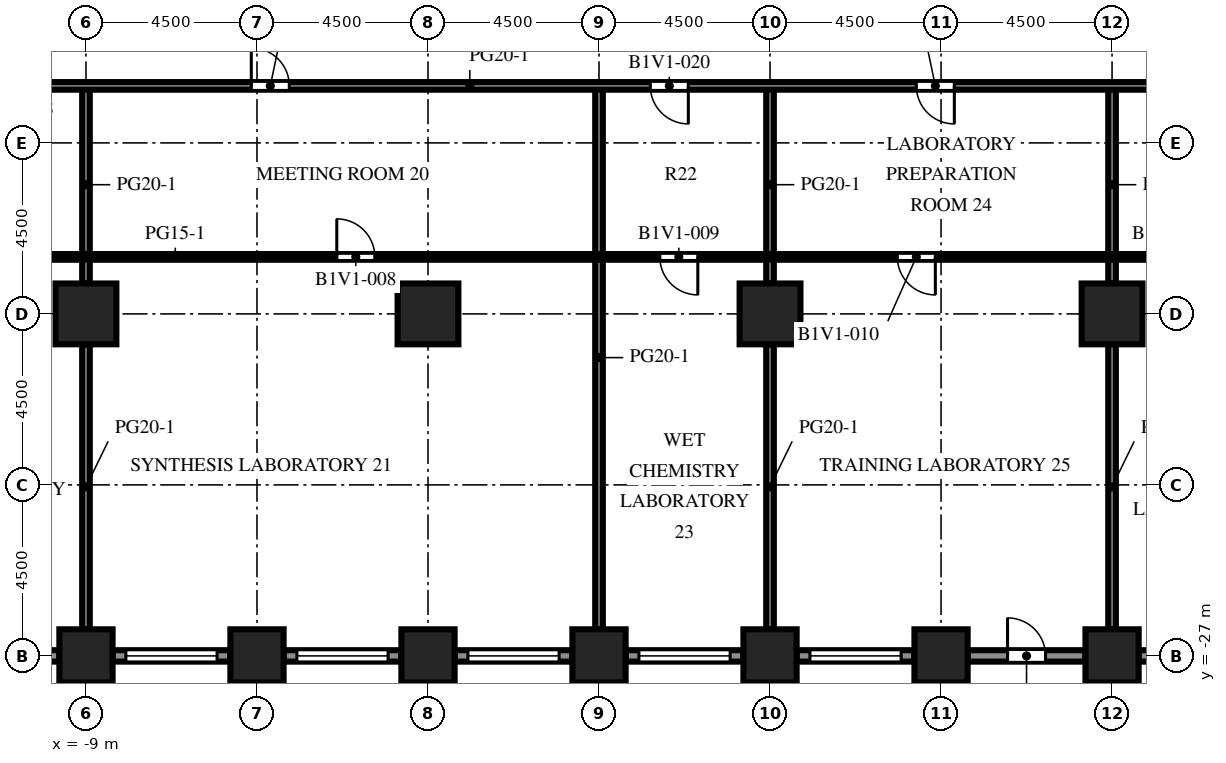
"""IFC4 building model, lengths in metres.
Left out: names, types, materials, properties, quantities, classifications, styles, units other than length and angle.
Written with IfcOpenShell. Run it as: python <this file> out.ifc"""

import sys

from ifc_helpers import new_model, si_unit, direction, frame, frame_2d, origin, origin_2d, place, context, subcontext, project, spatial, rectangle, extrude, element, fill, save


model = new_model("IFC4")
c1 = context("Model", 3, precision=1e-05, world=origin(), true_north=direction((0.0, 1.0)))
c2 = subcontext(c1, "Body", "Model", "MODEL_VIEW")
j1 = project(units=[si_unit("LENGTHUNIT", "METRE"), si_unit("PLANEANGLEUNIT", "RADIAN")], contexts=[c1])
p1 = place(None, origin())
s1 = spatial("IfcSite", under=j1, at=p1, CompositionType="ELEMENT")
p2 = place(p1, origin())
s2 = spatial("IfcBuilding", under=s1, at=p2, CompositionType="ELEMENT")
p3 = place(p2, frame((0.0, 0.0, 23.6)))
s3 = spatial("IfcBuildingStorey", under=s2, at=p3, CompositionType="ELEMENT", Elevation=23.6)
for number, where, z_axis, x_axis in (
    (1, (-9.0, -27.0, 0.0), (0.0, 0.0, 1.0), (1.0, 0.0, 0.0)),
    (2, (-4.5, -27.0, 0.0), (0.0, 0.0, 1.0), (1.0, 0.0, 0.0)),
    (3, (0.0, -27.0, 0.0), (0.0, 0.0, 1.0), (1.0, 0.0, 0.0)),
    (4, (4.5, -27.0, 0.0), (0.0, 0.0, 1.0), (1.0, 0.0, 0.0)),
    (5, (9.0, -27.0, 0.0), (0.0, 0.0, 1.0), (1.0, 0.0, 0.0)),
    (6, (13.5, -27.0, 0.0), (0.0, 0.0, 1.0), (1.0, 0.0, 0.0)),
    (7, (18.0, -27.0, 0.0), (0.0, 0.0, 1.0), (1.0, 0.0, 0.0)),
):
    element("IfcColumn", number, at=place(p3, frame(where, z_axis=z_axis, x_axis=x_axis)), inside=s3, PredefinedType="COLUMN", context=c2, shape_type="SweptSolid", body=[
        extrude(rectangle(XDim=1.4, YDim=1.4, at=origin_2d()), origin(), (0.0, 0.0, 1.0), 4.1),
    ])
for number, where, z_axis, x_axis in (
    (8, (-9.0, -18.0, 0.0), (0.0, 0.0, 1.0), (1.0, 0.0, 0.0)),
    (9, (0.0, -18.0, 0.0), (0.0, 0.0, 1.0), (1.0, 0.0, 0.0)),
    (10, (9.0, -18.0, 0.0), (0.0, 0.0, 1.0), (1.0, 0.0, 0.0)),
    (11, (18.0, -18.0, 0.0), (0.0, 0.0, 1.0), (1.0, 0.0, 0.0)),
):
    element("IfcColumn", number, at=place(p3, frame(where, z_axis=z_axis, x_axis=x_axis)), inside=s3, PredefinedType="COLUMN", context=c2, shape_type="SweptSolid", body=[
        extrude(rectangle(XDim=1.6, YDim=1.6, at=origin_2d()), origin(), (0.0, 0.0, 1.0), 4.1),
    ])
p4 = place(p3, frame((-9.7, -27.0, 0.0), z_axis=(0.0, 0.0, 1.0), x_axis=(-1.0, 0.0, 0.0)))
e12 = element("IfcWall", 12, at=p4, inside=s3, PredefinedType="SOLIDWALL", context=c2, shape_type="SweptSolid", body=[
    extrude(rectangle(XDim=3.1, YDim=0.3, at=frame_2d((1.55, 0.0))), origin(), (0.0, 0.0, 1.0), 2.75),
])
p5 = place(p4, frame((0.35, 0.0, 0.8)))
e13 = element("IfcOpeningElement", 13, at=p5, cuts=e12, PredefinedType="OPENING", context=c2, shape_type="SweptSolid", body=[
    extrude(rectangle(XDim=2.4, YDim=1.7, at=frame_2d((1.2, 0.85))), frame((0.0, 0.16, 0.0), z_axis=(0.0, -1.0, 0.0), x_axis=(1.0, 0.0, 0.0)), (0.0, 0.0, 1.0), 0.32),
])
p6 = place(p3, frame((-5.2, -27.0, 0.0), z_axis=(0.0, 0.0, 1.0), x_axis=(-1.0, 0.0, 0.0)))
e14 = element("IfcWall", 14, at=p6, inside=s3, PredefinedType="SOLIDWALL", context=c2, shape_type="SweptSolid", body=[
    extrude(rectangle(XDim=3.1, YDim=0.3, at=frame_2d((1.55, 0.0))), origin(), (0.0, 0.0, 1.0), 2.75),
])
p7 = place(p6, frame((0.35, 0.0, 0.8)))
e15 = element("IfcOpeningElement", 15, at=p7, cuts=e14, PredefinedType="OPENING", context=c2, shape_type="SweptSolid", body=[
    extrude(rectangle(XDim=2.4, YDim=1.7, at=frame_2d((1.2, 0.85))), frame((0.0, 0.16, 0.0), z_axis=(0.0, -1.0, 0.0), x_axis=(1.0, 0.0, 0.0)), (0.0, 0.0, 1.0), 0.32),
])
p8 = place(p3, frame((-0.7, -27.0, 0.0), z_axis=(0.0, 0.0, 1.0), x_axis=(-1.0, 0.0, 0.0)))
e16 = element("IfcWall", 16, at=p8, inside=s3, PredefinedType="SOLIDWALL", context=c2, shape_type="SweptSolid", body=[
    extrude(rectangle(XDim=3.1, YDim=0.3, at=frame_2d((1.55, 0.0))), origin(), (0.0, 0.0, 1.0), 2.75),
])
p9 = place(p8, frame((0.35, 0.0, 0.8)))
e17 = element("IfcOpeningElement", 17, at=p9, cuts=e16, PredefinedType="OPENING", context=c2, shape_type="SweptSolid", body=[
    extrude(rectangle(XDim=2.4, YDim=1.7, at=frame_2d((1.2, 0.85))), frame((0.0, 0.16, 0.0), z_axis=(0.0, -1.0, 0.0), x_axis=(1.0, 0.0, 0.0)), (0.0, 0.0, 1.0), 0.32),
])
p10 = place(p3, frame((3.8, -27.0, 0.0), z_axis=(0.0, 0.0, 1.0), x_axis=(-1.0, 0.0, 0.0)))
e18 = element("IfcWall", 18, at=p10, inside=s3, PredefinedType="SOLIDWALL", context=c2, shape_type="SweptSolid", body=[
    extrude(rectangle(XDim=3.1, YDim=0.3, at=frame_2d((1.55, 0.0))), origin(), (0.0, 0.0, 1.0), 2.75),
])
p11 = place(p10, frame((0.35, 0.0, 0.8)))
e19 = element("IfcOpeningElement", 19, at=p11, cuts=e18, PredefinedType="OPENING", context=c2, shape_type="SweptSolid", body=[
    extrude(rectangle(XDim=2.4, YDim=1.7, at=frame_2d((1.2, 0.85))), frame((0.0, 0.16, 0.0), z_axis=(0.0, -1.0, 0.0), x_axis=(1.0, 0.0, 0.0)), (0.0, 0.0, 1.0), 0.32),
])
p12 = place(p3, frame((8.3, -27.0, 0.0), z_axis=(0.0, 0.0, 1.0), x_axis=(-1.0, 0.0, 0.0)))
e20 = element("IfcWall", 20, at=p12, inside=s3, PredefinedType="SOLIDWALL", context=c2, shape_type="SweptSolid", body=[
    extrude(rectangle(XDim=3.1, YDim=0.3, at=frame_2d((1.55, 0.0))), origin(), (0.0, 0.0, 1.0), 2.75),
])
p13 = place(p12, frame((0.35, 0.0, 0.8)))
e21 = element("IfcOpeningElement", 21, at=p13, cuts=e20, PredefinedType="OPENING", context=c2, shape_type="SweptSolid", body=[
    extrude(rectangle(XDim=2.4, YDim=1.7, at=frame_2d((1.2, 0.85))), frame((0.0, 0.16, 0.0), z_axis=(0.0, -1.0, 0.0), x_axis=(1.0, 0.0, 0.0)), (0.0, 0.0, 1.0), 0.32),
])
p14 = place(p3, frame((12.8, -27.0, 0.0), z_axis=(0.0, 0.0, 1.0), x_axis=(-1.0, 0.0, 0.0)))
e22 = element("IfcWall", 22, at=p14, inside=s3, PredefinedType="SOLIDWALL", context=c2, shape_type="SweptSolid", body=[
    extrude(rectangle(XDim=3.1, YDim=0.3, at=frame_2d((1.55, 0.0))), origin(), (0.0, 0.0, 1.0), 2.75),
])
p15 = place(p14, frame((0.35, 0.0, 0.8)))
e23 = element("IfcOpeningElement", 23, at=p15, cuts=e22, PredefinedType="OPENING", context=c2, shape_type="SweptSolid", body=[
    extrude(rectangle(XDim=2.4, YDim=1.7, at=frame_2d((1.2, 0.85))), frame((0.0, 0.16, 0.0), z_axis=(0.0, -1.0, 0.0), x_axis=(1.0, 0.0, 0.0)), (0.0, 0.0, 1.0), 0.32),
])
p16 = place(p3, frame((17.3, -27.0, 0.0), z_axis=(0.0, 0.0, 1.0), x_axis=(-1.0, 0.0, 0.0)))
e24 = element("IfcWall", 24, at=p16, inside=s3, PredefinedType="SOLIDWALL", context=c2, shape_type="SweptSolid", body=[
    extrude(rectangle(XDim=3.1, YDim=0.3, at=frame_2d((1.55, 0.0))), origin(), (0.0, 0.0, 1.0), 2.75),
])
p17 = place(p16, frame((1.05, 0.0, 0.0)))
e25 = element("IfcOpeningElement", 25, at=p17, cuts=e24, PredefinedType="OPENING", context=c2, shape_type="SweptSolid", body=[
    extrude(rectangle(XDim=1.0, YDim=2.2, at=frame_2d((0.5, 1.1))), frame((0.0, 0.16, 0.0), z_axis=(0.0, -1.0, 0.0), x_axis=(1.0, 0.0, 0.0)), (0.0, 0.0, 1.0), 0.32),
])
p18 = place(p3, frame((21.8, -27.0, 0.0), z_axis=(0.0, 0.0, 1.0), x_axis=(-1.0, 0.0, 0.0)))
e26 = element("IfcWall", 26, at=p18, inside=s3, PredefinedType="SOLIDWALL", context=c2, shape_type="SweptSolid", body=[
    extrude(rectangle(XDim=3.1, YDim=0.3, at=frame_2d((1.55, 0.0))), origin(), (0.0, 0.0, 1.0), 2.75),
])
p19 = place(p18, frame((0.35, 0.0, 0.8)))
e27 = element("IfcOpeningElement", 27, at=p19, cuts=e26, PredefinedType="OPENING", context=c2, shape_type="SweptSolid", body=[
    extrude(rectangle(XDim=2.4, YDim=1.7, at=frame_2d((1.2, 0.85))), frame((0.0, 0.16, 0.0), z_axis=(0.0, -1.0, 0.0), x_axis=(1.0, 0.0, 0.0)), (0.0, 0.0, 1.0), 0.32),
])
p20 = place(p3, frame((-9.0, -26.3, 0.0), z_axis=(0.0, 0.0, 1.0), x_axis=(0.0, 1.0, 0.0)))
e28 = element("IfcWall", 28, at=p20, inside=s3, PredefinedType="PARTITIONING", context=c2, shape_type="SweptSolid", body=[
    extrude(rectangle(XDim=7.5, YDim=0.2, at=frame_2d((3.75, 0.0))), origin(), (0.0, 0.0, 1.0), 3.65),
])
p21 = place(p3, frame((-9.0, -17.2, 0.0), z_axis=(0.0, 0.0, 1.0), x_axis=(0.0, 1.0, 0.0)))
e29 = element("IfcWall", 29, at=p21, inside=s3, PredefinedType="PARTITIONING", context=c2, shape_type="SweptSolid", body=[
    extrude(rectangle(XDim=5.2, YDim=0.2, at=frame_2d((2.6, 0.0))), origin(), (0.0, 0.0, 1.0), 3.65),
])
p22 = place(p3, frame((4.5, -26.3, 0.0), z_axis=(0.0, 0.0, 1.0), x_axis=(0.0, 1.0, 0.0)))
e30 = element("IfcWall", 30, at=p22, inside=s3, PredefinedType="PARTITIONING", context=c2, shape_type="SweptSolid", body=[
    extrude(rectangle(XDim=14.3, YDim=0.2, at=frame_2d((7.15, 0.0))), origin(), (0.0, 0.0, 1.0), 3.65),
])
p23 = place(p3, frame((9.0, -26.3, 0.0), z_axis=(0.0, 0.0, 1.0), x_axis=(0.0, 1.0, 0.0)))
e31 = element("IfcWall", 31, at=p23, inside=s3, PredefinedType="PARTITIONING", context=c2, shape_type="SweptSolid", body=[
    extrude(rectangle(XDim=7.5, YDim=0.2, at=frame_2d((3.75, 0.0))), origin(), (0.0, 0.0, 1.0), 3.65),
])
p24 = place(p3, frame((9.0, -17.2, 0.0), z_axis=(0.0, 0.0, 1.0), x_axis=(0.0, 1.0, 0.0)))
e32 = element("IfcWall", 32, at=p24, inside=s3, PredefinedType="PARTITIONING", context=c2, shape_type="SweptSolid", body=[
    extrude(rectangle(XDim=5.2, YDim=0.2, at=frame_2d((2.6, 0.0))), origin(), (0.0, 0.0, 1.0), 3.65),
])
p25 = place(p3, frame((18.0, -26.3, 0.0), z_axis=(0.0, 0.0, 1.0), x_axis=(0.0, 1.0, 0.0)))
e33 = element("IfcWall", 33, at=p25, inside=s3, PredefinedType="PARTITIONING", context=c2, shape_type="SweptSolid", body=[
    extrude(rectangle(XDim=7.5, YDim=0.2, at=frame_2d((3.75, 0.0))), origin(), (0.0, 0.0, 1.0), 3.65),
])
p26 = place(p3, frame((18.0, -17.2, 0.0), z_axis=(0.0, 0.0, 1.0), x_axis=(0.0, 1.0, 0.0)))
e34 = element("IfcWall", 34, at=p26, inside=s3, PredefinedType="PARTITIONING", context=c2, shape_type="SweptSolid", body=[
    extrude(rectangle(XDim=5.2, YDim=0.2, at=frame_2d((2.6, 0.0))), origin(), (0.0, 0.0, 1.0), 3.65),
])
p27 = place(p3, frame((26.85, -16.5, 0.0), z_axis=(0.0, 0.0, 1.0), x_axis=(-1.0, 0.0, 0.0)))
e35 = element("IfcWall", 35, at=p27, inside=s3, PredefinedType="PARTITIONING", context=c2, shape_type="SweptSolid", body=[
    extrude(rectangle(XDim=53.7, YDim=0.15, at=frame_2d((26.85, 0.0))), origin(), (0.0, 0.0, 1.0), 3.65),
])
p28 = place(p27, frame((50.75, 0.0, 0.0)))
e36 = element("IfcOpeningElement", 36, at=p28, cuts=e35, PredefinedType="OPENING", context=c2, shape_type="SweptSolid", body=[
    extrude(rectangle(XDim=1.0, YDim=2.1, at=frame_2d((0.5, 1.05))), frame((0.0, 0.085, 0.0), z_axis=(0.0, -1.0, 0.0), x_axis=(1.0, 0.0, 0.0)), (0.0, 0.0, 1.0), 0.17),
])
p29 = place(p27, frame((45.75, 0.0, 0.0)))
e37 = element("IfcOpeningElement", 37, at=p29, cuts=e35, PredefinedType="OPENING", context=c2, shape_type="SweptSolid", body=[
    extrude(rectangle(XDim=1.0, YDim=2.1, at=frame_2d((0.5, 1.05))), frame((0.0, 0.085, 0.0), z_axis=(0.0, -1.0, 0.0), x_axis=(1.0, 0.0, 0.0)), (0.0, 0.0, 1.0), 0.17),
])
p30 = place(p27, frame((37.75, 0.0, 0.0)))
e38 = element("IfcOpeningElement", 38, at=p30, cuts=e35, PredefinedType="OPENING", context=c2, shape_type="SweptSolid", body=[
    extrude(rectangle(XDim=1.0, YDim=2.1, at=frame_2d((0.5, 1.05))), frame((0.0, 0.085, 0.0), z_axis=(0.0, -1.0, 0.0), x_axis=(1.0, 0.0, 0.0)), (0.0, 0.0, 1.0), 0.17),
])
p31 = place(p27, frame((28.25, 0.0, 0.0)))
e39 = element("IfcOpeningElement", 39, at=p31, cuts=e35, PredefinedType="OPENING", context=c2, shape_type="SweptSolid", body=[
    extrude(rectangle(XDim=1.0, YDim=2.1, at=frame_2d((0.5, 1.05))), frame((0.0, 0.085, 0.0), z_axis=(0.0, -1.0, 0.0), x_axis=(1.0, 0.0, 0.0)), (0.0, 0.0, 1.0), 0.17),
])
p32 = place(p27, frame((19.75, 0.0, 0.0)))
e40 = element("IfcOpeningElement", 40, at=p32, cuts=e35, PredefinedType="OPENING", context=c2, shape_type="SweptSolid", body=[
    extrude(rectangle(XDim=1.0, YDim=2.1, at=frame_2d((0.5, 1.05))), frame((0.0, 0.085, 0.0), z_axis=(0.0, -1.0, 0.0), x_axis=(1.0, 0.0, 0.0)), (0.0, 0.0, 1.0), 0.17),
])
p33 = place(p27, frame((13.5, 0.0, 0.0)))
e41 = element("IfcOpeningElement", 41, at=p33, cuts=e35, PredefinedType="OPENING", context=c2, shape_type="SweptSolid", body=[
    extrude(rectangle(XDim=1.0, YDim=2.1, at=frame_2d((0.5, 1.05))), frame((0.0, 0.085, 0.0), z_axis=(0.0, -1.0, 0.0), x_axis=(1.0, 0.0, 0.0)), (0.0, 0.0, 1.0), 0.17),
])
p34 = place(p27, frame((6.75, 0.0, 0.0)))
e42 = element("IfcOpeningElement", 42, at=p34, cuts=e35, PredefinedType="OPENING", context=c2, shape_type="SweptSolid", body=[
    extrude(rectangle(XDim=1.0, YDim=2.1, at=frame_2d((0.5, 1.05))), frame((0.0, 0.085, 0.0), z_axis=(0.0, -1.0, 0.0), x_axis=(1.0, 0.0, 0.0)), (0.0, 0.0, 1.0), 0.17),
])
p35 = place(p27, frame((1.25, 0.0, 0.0)))
e43 = element("IfcOpeningElement", 43, at=p35, cuts=e35, PredefinedType="OPENING", context=c2, shape_type="SweptSolid", body=[
    extrude(rectangle(XDim=1.0, YDim=2.1, at=frame_2d((0.5, 1.05))), frame((0.0, 0.085, 0.0), z_axis=(0.0, -1.0, 0.0), x_axis=(1.0, 0.0, 0.0)), (0.0, 0.0, 1.0), 0.17),
])
p36 = place(p3, frame((26.85, -12.0, 0.0), z_axis=(0.0, 0.0, 1.0), x_axis=(-1.0, 0.0, 0.0)))
e44 = element("IfcWall", 44, at=p36, inside=s3, PredefinedType="PARTITIONING", context=c2, shape_type="SweptSolid", body=[
    extrude(rectangle(XDim=53.7, YDim=0.2, at=frame_2d((26.85, 0.0))), origin(), (0.0, 0.0, 1.0), 3.65),
])
p37 = place(p36, frame((51.5, 0.0, 0.0)))
e45 = element("IfcOpeningElement", 45, at=p37, cuts=e44, PredefinedType="OPENING", context=c2, shape_type="SweptSolid", body=[
    extrude(rectangle(XDim=1.0, YDim=2.1, at=frame_2d((0.5, 1.05))), frame((0.0, 0.11, 0.0), z_axis=(0.0, -1.0, 0.0), x_axis=(1.0, 0.0, 0.0)), (0.0, 0.0, 1.0), 0.22),
])
p38 = place(p36, frame((44.0, 0.0, 0.0)))
e46 = element("IfcOpeningElement", 46, at=p38, cuts=e44, PredefinedType="OPENING", context=c2, shape_type="SweptSolid", body=[
    extrude(rectangle(XDim=1.0, YDim=2.1, at=frame_2d((0.5, 1.05))), frame((0.0, 0.11, 0.0), z_axis=(0.0, -1.0, 0.0), x_axis=(1.0, 0.0, 0.0)), (0.0, 0.0, 1.0), 0.22),
])
p39 = place(p36, frame((37.25, 0.0, 0.0)))
e47 = element("IfcOpeningElement", 47, at=p39, cuts=e44, PredefinedType="OPENING", context=c2, shape_type="SweptSolid", body=[
    extrude(rectangle(XDim=1.0, YDim=2.1, at=frame_2d((0.5, 1.05))), frame((0.0, 0.11, 0.0), z_axis=(0.0, -1.0, 0.0), x_axis=(1.0, 0.0, 0.0)), (0.0, 0.0, 1.0), 0.22),
])
p40 = place(p36, frame((30.5, 0.0, 0.0)))
e48 = element("IfcOpeningElement", 48, at=p40, cuts=e44, PredefinedType="OPENING", context=c2, shape_type="SweptSolid", body=[
    extrude(rectangle(XDim=1.0, YDim=2.1, at=frame_2d((0.5, 1.05))), frame((0.0, 0.11, 0.0), z_axis=(0.0, -1.0, 0.0), x_axis=(1.0, 0.0, 0.0)), (0.0, 0.0, 1.0), 0.22),
])
p41 = place(p36, frame((20.0, 0.0, 0.0)))
e49 = element("IfcOpeningElement", 49, at=p41, cuts=e44, PredefinedType="OPENING", context=c2, shape_type="SweptSolid", body=[
    extrude(rectangle(XDim=1.0, YDim=2.1, at=frame_2d((0.5, 1.05))), frame((0.0, 0.11, 0.0), z_axis=(0.0, -1.0, 0.0), x_axis=(1.0, 0.0, 0.0)), (0.0, 0.0, 1.0), 0.22),
])
p42 = place(p36, frame((13.0, 0.0, 0.0)))
e50 = element("IfcOpeningElement", 50, at=p42, cuts=e44, PredefinedType="OPENING", context=c2, shape_type="SweptSolid", body=[
    extrude(rectangle(XDim=1.0, YDim=2.1, at=frame_2d((0.5, 1.05))), frame((0.0, 0.11, 0.0), z_axis=(0.0, -1.0, 0.0), x_axis=(1.0, 0.0, 0.0)), (0.0, 0.0, 1.0), 0.22),
])
p43 = place(p36, frame((5.75, 0.0, 0.0)))
e51 = element("IfcOpeningElement", 51, at=p43, cuts=e44, PredefinedType="OPENING", context=c2, shape_type="SweptSolid", body=[
    extrude(rectangle(XDim=1.0, YDim=2.1, at=frame_2d((0.5, 1.05))), frame((0.0, 0.11, 0.0), z_axis=(0.0, -1.0, 0.0), x_axis=(1.0, 0.0, 0.0)), (0.0, 0.0, 1.0), 0.22),
])
p44 = place(p36, frame((1.25, 0.0, 0.0)))
e52 = element("IfcOpeningElement", 52, at=p44, cuts=e44, PredefinedType="OPENING", context=c2, shape_type="SweptSolid", body=[
    extrude(rectangle(XDim=1.0, YDim=2.1, at=frame_2d((0.5, 1.05))), frame((0.0, 0.11, 0.0), z_axis=(0.0, -1.0, 0.0), x_axis=(1.0, 0.0, 0.0)), (0.0, 0.0, 1.0), 0.22),
])
p45 = place(p7, origin())
e53 = element("IfcWindow", 53, at=p45, inside=s3, PartitioningType="SINGLE_PANEL", PredefinedType="WINDOW", context=c2, shape_type="SweptSolid", body=[
    extrude(rectangle(XDim=2.4, YDim=1.7, at=frame_2d((1.2, 0.85))), frame((0.0, 0.03, 0.0), z_axis=(0.0, -1.0, 0.0), x_axis=(1.0, 0.0, 0.0)), (0.0, 0.0, 1.0), 0.06),
])
fill(e15, e53)
p46 = place(p9, origin())
e54 = element("IfcWindow", 54, at=p46, inside=s3, PartitioningType="SINGLE_PANEL", PredefinedType="WINDOW", context=c2, shape_type="SweptSolid", body=[
    extrude(rectangle(XDim=2.4, YDim=1.7, at=frame_2d((1.2, 0.85))), frame((0.0, 0.03, 0.0), z_axis=(0.0, -1.0, 0.0), x_axis=(1.0, 0.0, 0.0)), (0.0, 0.0, 1.0), 0.06),
])
fill(e17, e54)
p47 = place(p11, origin())
e55 = element("IfcWindow", 55, at=p47, inside=s3, PartitioningType="SINGLE_PANEL", PredefinedType="WINDOW", context=c2, shape_type="SweptSolid", body=[
    extrude(rectangle(XDim=2.4, YDim=1.7, at=frame_2d((1.2, 0.85))), frame((0.0, 0.03, 0.0), z_axis=(0.0, -1.0, 0.0), x_axis=(1.0, 0.0, 0.0)), (0.0, 0.0, 1.0), 0.06),
])
fill(e19, e55)
p48 = place(p13, origin())
e56 = element("IfcWindow", 56, at=p48, inside=s3, PartitioningType="SINGLE_PANEL", PredefinedType="WINDOW", context=c2, shape_type="SweptSolid", body=[
    extrude(rectangle(XDim=2.4, YDim=1.7, at=frame_2d((1.2, 0.85))), frame((0.0, 0.03, 0.0), z_axis=(0.0, -1.0, 0.0), x_axis=(1.0, 0.0, 0.0)), (0.0, 0.0, 1.0), 0.06),
])
fill(e21, e56)
p49 = place(p15, origin())
e57 = element("IfcWindow", 57, at=p49, inside=s3, PartitioningType="SINGLE_PANEL", PredefinedType="WINDOW", context=c2, shape_type="SweptSolid", body=[
    extrude(rectangle(XDim=2.4, YDim=1.7, at=frame_2d((1.2, 0.85))), frame((0.0, 0.03, 0.0), z_axis=(0.0, -1.0, 0.0), x_axis=(1.0, 0.0, 0.0)), (0.0, 0.0, 1.0), 0.06),
])
fill(e23, e57)
p50 = place(p17, origin())
e58 = element("IfcDoor", 58, at=p50, inside=s3, OperationType="SINGLE_SWING_RIGHT", PredefinedType="DOOR", context=c2, shape_type="SweptSolid", body=[
    extrude(rectangle(XDim=1.0, YDim=2.2, at=frame_2d((0.5, 1.1))), frame((0.0, 0.025, 0.0), z_axis=(0.0, -1.0, 0.0), x_axis=(1.0, 0.0, 0.0)), (0.0, 0.0, 1.0), 0.05),
])
fill(e25, e58)
p51 = place(p31, origin())
e59 = element("IfcDoor", 59, at=p51, inside=s3, OperationType="SINGLE_SWING_RIGHT", PredefinedType="DOOR", context=c2, shape_type="SweptSolid", body=[
    extrude(rectangle(XDim=1.0, YDim=2.1, at=frame_2d((0.5, 1.05))), frame((0.0, 0.025, 0.0), z_axis=(0.0, -1.0, 0.0), x_axis=(1.0, 0.0, 0.0)), (0.0, 0.0, 1.0), 0.05),
])
fill(e39, e59)
p52 = place(p32, origin())
e60 = element("IfcDoor", 60, at=p52, inside=s3, OperationType="SINGLE_SWING_LEFT", PredefinedType="DOOR", context=c2, shape_type="SweptSolid", body=[
    extrude(rectangle(XDim=1.0, YDim=2.1, at=frame_2d((0.5, 1.05))), frame((0.0, 0.025, 0.0), z_axis=(0.0, -1.0, 0.0), x_axis=(1.0, 0.0, 0.0)), (0.0, 0.0, 1.0), 0.05),
])
fill(e40, e60)
p53 = place(p33, origin())
e61 = element("IfcDoor", 61, at=p53, inside=s3, OperationType="SINGLE_SWING_LEFT", PredefinedType="DOOR", context=c2, shape_type="SweptSolid", body=[
    extrude(rectangle(XDim=1.0, YDim=2.1, at=frame_2d((0.5, 1.05))), frame((0.0, 0.025, 0.0), z_axis=(0.0, -1.0, 0.0), x_axis=(1.0, 0.0, 0.0)), (0.0, 0.0, 1.0), 0.05),
])
fill(e41, e61)
p54 = place(p40, origin())
e62 = element("IfcDoor", 62, at=p54, inside=s3, OperationType="SINGLE_SWING_RIGHT", PredefinedType="DOOR", context=c2, shape_type="SweptSolid", body=[
    extrude(rectangle(XDim=1.0, YDim=2.1, at=frame_2d((0.5, 1.05))), frame((0.0, 0.025, 0.0), z_axis=(0.0, -1.0, 0.0), x_axis=(1.0, 0.0, 0.0)), (0.0, 0.0, 1.0), 0.05),
])
fill(e48, e62)
p55 = place(p41, origin())
e63 = element("IfcDoor", 63, at=p55, inside=s3, OperationType="SINGLE_SWING_LEFT", PredefinedType="DOOR", context=c2, shape_type="SweptSolid", body=[
    extrude(rectangle(XDim=1.0, YDim=2.1, at=frame_2d((0.5, 1.05))), frame((0.0, 0.025, 0.0), z_axis=(0.0, -1.0, 0.0), x_axis=(1.0, 0.0, 0.0)), (0.0, 0.0, 1.0), 0.05),
])
fill(e49, e63)
p56 = place(p42, origin())
e64 = element("IfcDoor", 64, at=p56, inside=s3, OperationType="SINGLE_SWING_LEFT", PredefinedType="DOOR", context=c2, shape_type="SweptSolid", body=[
    extrude(rectangle(XDim=1.0, YDim=2.1, at=frame_2d((0.5, 1.05))), frame((0.0, 0.025, 0.0), z_axis=(0.0, -1.0, 0.0), x_axis=(1.0, 0.0, 0.0)), (0.0, 0.0, 1.0), 0.05),
])
fill(e50, e64)
save(model, sys.argv[1])
